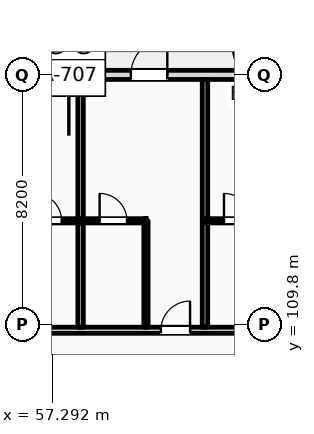
"""IFC4 building model, lengths in metres.
Left out: names, types, materials, properties, quantities, classifications, styles, units other than length and angle.
Written with IfcOpenShell. Run it as: python <this file> out.ifc"""

import sys

from ifc_helpers import new_model, si_unit, direction, frame, frame_2d, origin, place, context, subcontext, project, spatial, rectangle, extrude, element, fill, save


model = new_model("IFC4")
c1 = context("Model", 3, precision=1e-05, world=origin(), true_north=direction((0.0, 1.0)))
c2 = subcontext(c1, "Body", "Model", "MODEL_VIEW")
j1 = project(units=[si_unit("LENGTHUNIT", "METRE"), si_unit("PLANEANGLEUNIT", "RADIAN")], contexts=[c1])
p1 = place(None, origin())
s1 = spatial("IfcSite", under=j1, at=p1, CompositionType="ELEMENT")
p2 = place(p1, origin())
s2 = spatial("IfcBuilding", under=s1, at=p2, CompositionType="ELEMENT")
p3 = place(p2, frame((0.0, 0.0, 28.2)))
s3 = spatial("IfcBuildingStorey", under=s2, at=p3, CompositionType="ELEMENT", Elevation=28.2)
p4 = place(p3, frame((22.5, 118.0, 0.0), z_axis=(0.0, 0.0, 1.0), x_axis=(1.0, 0.0, 0.0)))
e1 = element("IfcWall", 1, at=p4, inside=s3, PredefinedType="STANDARD", context=c2, shape_type="SweptSolid", body=[
    extrude(rectangle(XDim=97.5, YDim=0.3, at=frame_2d((48.75, 0.0))), origin(), (0.0, 0.0, 1.0), 2.8),
])
p5 = place(p4, frame((0.91, 0.0, 0.9)))
e2 = element("IfcOpeningElement", 2, at=p5, cuts=e1, PredefinedType="OPENING", context=c2, shape_type="SweptSolid", body=[
    extrude(rectangle(XDim=0.9, YDim=1.72, at=frame_2d((0.45, 0.86))), frame((0.0, 0.16, 0.0), z_axis=(0.0, -1.0, 0.0), x_axis=(1.0, 0.0, 0.0)), (0.0, 0.0, 1.0), 0.32),
])
p6 = place(p4, frame((6.561, 0.0, 0.0)))
e3 = element("IfcOpeningElement", 3, at=p6, cuts=e1, PredefinedType="OPENING", context=c2, shape_type="SweptSolid", body=[
    extrude(rectangle(XDim=1.2, YDim=2.25, at=frame_2d((0.6, 1.125))), frame((0.0, 0.16, 0.0), z_axis=(0.0, -1.0, 0.0), x_axis=(1.0, 0.0, 0.0)), (0.0, 0.0, 1.0), 0.32),
])
p7 = place(p4, frame((11.477, 0.0, 0.9)))
e4 = element("IfcOpeningElement", 4, at=p7, cuts=e1, PredefinedType="OPENING", context=c2, shape_type="SweptSolid", body=[
    extrude(rectangle(XDim=1.1, YDim=1.5, at=frame_2d((0.55, 0.75))), frame((0.0, 0.16, 0.0), z_axis=(0.0, -1.0, 0.0), x_axis=(1.0, 0.0, 0.0)), (0.0, 0.0, 1.0), 0.32),
])
p8 = place(p4, frame((15.194, 0.0, 0.9)))
e5 = element("IfcOpeningElement", 5, at=p8, cuts=e1, PredefinedType="OPENING", context=c2, shape_type="SweptSolid", body=[
    extrude(rectangle(XDim=1.25, YDim=1.6, at=frame_2d((0.625, 0.8))), frame((0.0, 0.16, 0.0), z_axis=(0.0, -1.0, 0.0), x_axis=(1.0, 0.0, 0.0)), (0.0, 0.0, 1.0), 0.32),
])
p9 = place(p4, frame((19.509, 0.0, 0.9)))
e6 = element("IfcOpeningElement", 6, at=p9, cuts=e1, PredefinedType="OPENING", context=c2, shape_type="SweptSolid", body=[
    extrude(rectangle(XDim=1.4, YDim=1.7, at=frame_2d((0.7, 0.85))), frame((0.0, 0.16, 0.0), z_axis=(0.0, -1.0, 0.0), x_axis=(1.0, 0.0, 0.0)), (0.0, 0.0, 1.0), 0.32),
])
p10 = place(p4, frame((23.258, 0.0, 0.0)))
e7 = element("IfcOpeningElement", 7, at=p10, cuts=e1, PredefinedType="OPENING", context=c2, shape_type="SweptSolid", body=[
    extrude(rectangle(XDim=1.2, YDim=2.25, at=frame_2d((0.6, 1.125))), frame((0.0, 0.16, 0.0), z_axis=(0.0, -1.0, 0.0), x_axis=(1.0, 0.0, 0.0)), (0.0, 0.0, 1.0), 0.32),
])
p11 = place(p4, frame((28.115, 0.0, 0.9)))
e8 = element("IfcOpeningElement", 8, at=p11, cuts=e1, PredefinedType="OPENING", context=c2, shape_type="SweptSolid", body=[
    extrude(rectangle(XDim=1.75, YDim=1.72, at=frame_2d((0.875, 0.86))), frame((0.0, 0.16, 0.0), z_axis=(0.0, -1.0, 0.0), x_axis=(1.0, 0.0, 0.0)), (0.0, 0.0, 1.0), 0.32),
])
p12 = place(p4, frame((31.582, 0.0, 0.9)))
e9 = element("IfcOpeningElement", 9, at=p12, cuts=e1, PredefinedType="OPENING", context=c2, shape_type="SweptSolid", body=[
    extrude(rectangle(XDim=1.35, YDim=1.72, at=frame_2d((0.675, 0.86))), frame((0.0, 0.16, 0.0), z_axis=(0.0, -1.0, 0.0), x_axis=(1.0, 0.0, 0.0)), (0.0, 0.0, 1.0), 0.32),
])
p13 = place(p4, frame((37.379, 0.0, 0.0)))
e10 = element("IfcOpeningElement", 10, at=p13, cuts=e1, PredefinedType="OPENING", context=c2, shape_type="SweptSolid", body=[
    extrude(rectangle(XDim=1.2, YDim=2.25, at=frame_2d((0.6, 1.125))), frame((0.0, 0.16, 0.0), z_axis=(0.0, -1.0, 0.0), x_axis=(1.0, 0.0, 0.0)), (0.0, 0.0, 1.0), 0.32),
])
p14 = place(p4, frame((42.663, 0.0, 0.9)))
e11 = element("IfcOpeningElement", 11, at=p14, cuts=e1, PredefinedType="OPENING", context=c2, shape_type="SweptSolid", body=[
    extrude(rectangle(XDim=1.35, YDim=1.72, at=frame_2d((0.675, 0.86))), frame((0.0, 0.16, 0.0), z_axis=(0.0, -1.0, 0.0), x_axis=(1.0, 0.0, 0.0)), (0.0, 0.0, 1.0), 0.32),
])
p15 = place(p4, frame((45.119, 0.0, 0.9)))
e12 = element("IfcOpeningElement", 12, at=p15, cuts=e1, PredefinedType="OPENING", context=c2, shape_type="SweptSolid", body=[
    extrude(rectangle(XDim=2.871, YDim=1.72, at=frame_2d((1.436, 0.86))), frame((0.0, 0.16, 0.0), z_axis=(0.0, -1.0, 0.0), x_axis=(1.0, 0.0, 0.0)), (0.0, 0.0, 1.0), 0.32),
])
p16 = place(p4, frame((50.41, 0.0, 0.9)))
e13 = element("IfcOpeningElement", 13, at=p16, cuts=e1, PredefinedType="OPENING", context=c2, shape_type="SweptSolid", body=[
    extrude(rectangle(XDim=1.8, YDim=1.72, at=frame_2d((0.9, 0.86))), frame((0.0, 0.16, 0.0), z_axis=(0.0, -1.0, 0.0), x_axis=(1.0, 0.0, 0.0)), (0.0, 0.0, 1.0), 0.32),
])
p17 = place(p4, frame((54.375, 0.0, 0.0)))
e14 = element("IfcOpeningElement", 14, at=p17, cuts=e1, PredefinedType="OPENING", context=c2, shape_type="SweptSolid", body=[
    extrude(rectangle(XDim=1.2, YDim=2.25, at=frame_2d((0.6, 1.125))), frame((0.0, 0.16, 0.0), z_axis=(0.0, -1.0, 0.0), x_axis=(1.0, 0.0, 0.0)), (0.0, 0.0, 1.0), 0.32),
])
p18 = place(p4, frame((59.052, 0.0, 0.9)))
e15 = element("IfcOpeningElement", 15, at=p18, cuts=e1, PredefinedType="OPENING", context=c2, shape_type="SweptSolid", body=[
    extrude(rectangle(XDim=1.35, YDim=1.72, at=frame_2d((0.675, 0.86))), frame((0.0, 0.16, 0.0), z_axis=(0.0, -1.0, 0.0), x_axis=(1.0, 0.0, 0.0)), (0.0, 0.0, 1.0), 0.32),
])
p19 = place(p4, frame((62.768, 0.0, 0.9)))
e16 = element("IfcOpeningElement", 16, at=p19, cuts=e1, PredefinedType="OPENING", context=c2, shape_type="SweptSolid", body=[
    extrude(rectangle(XDim=1.5, YDim=1.72, at=frame_2d((0.75, 0.86))), frame((0.0, 0.16, 0.0), z_axis=(0.0, -1.0, 0.0), x_axis=(1.0, 0.0, 0.0)), (0.0, 0.0, 1.0), 0.32),
])
p20 = place(p4, frame((68.498, 0.0, 0.0)))
e17 = element("IfcOpeningElement", 17, at=p20, cuts=e1, PredefinedType="OPENING", context=c2, shape_type="SweptSolid", body=[
    extrude(rectangle(XDim=1.2, YDim=2.25, at=frame_2d((0.6, 1.125))), frame((0.0, 0.16, 0.0), z_axis=(0.0, -1.0, 0.0), x_axis=(1.0, 0.0, 0.0)), (0.0, 0.0, 1.0), 0.32),
])
p21 = place(p4, frame((71.265, 0.0, 0.9)))
e18 = element("IfcOpeningElement", 18, at=p21, cuts=e1, PredefinedType="OPENING", context=c2, shape_type="SweptSolid", body=[
    extrude(rectangle(XDim=0.9, YDim=1.72, at=frame_2d((0.45, 0.86))), frame((0.0, 0.16, 0.0), z_axis=(0.0, -1.0, 0.0), x_axis=(1.0, 0.0, 0.0)), (0.0, 0.0, 1.0), 0.32),
])
p22 = place(p4, frame((76.316, 0.0, 0.9)))
e19 = element("IfcOpeningElement", 19, at=p22, cuts=e1, PredefinedType="OPENING", context=c2, shape_type="SweptSolid", body=[
    extrude(rectangle(XDim=1.95, YDim=1.72, at=frame_2d((0.975, 0.86))), frame((0.0, 0.16, 0.0), z_axis=(0.0, -1.0, 0.0), x_axis=(1.0, 0.0, 0.0)), (0.0, 0.0, 1.0), 0.32),
])
p23 = place(p4, frame((81.632, 0.0, 0.9)))
e20 = element("IfcOpeningElement", 20, at=p23, cuts=e1, PredefinedType="OPENING", context=c2, shape_type="SweptSolid", body=[
    extrude(rectangle(XDim=1.35, YDim=1.72, at=frame_2d((0.675, 0.86))), frame((0.0, 0.16, 0.0), z_axis=(0.0, -1.0, 0.0), x_axis=(1.0, 0.0, 0.0)), (0.0, 0.0, 1.0), 0.32),
])
p24 = place(p4, frame((84.948, 0.0, 0.9)))
e21 = element("IfcOpeningElement", 21, at=p24, cuts=e1, PredefinedType="OPENING", context=c2, shape_type="SweptSolid", body=[
    extrude(rectangle(XDim=2.25, YDim=1.72, at=frame_2d((1.125, 0.86))), frame((0.0, 0.16, 0.0), z_axis=(0.0, -1.0, 0.0), x_axis=(1.0, 0.0, 0.0)), (0.0, 0.0, 1.0), 0.32),
])
p25 = place(p4, frame((90.063, 0.0, 0.9)))
e22 = element("IfcOpeningElement", 22, at=p25, cuts=e1, PredefinedType="OPENING", context=c2, shape_type="SweptSolid", body=[
    extrude(rectangle(XDim=1.8, YDim=1.72, at=frame_2d((0.9, 0.86))), frame((0.0, 0.16, 0.0), z_axis=(0.0, -1.0, 0.0), x_axis=(1.0, 0.0, 0.0)), (0.0, 0.0, 1.0), 0.32),
])
p26 = place(p4, frame((93.529, 0.0, 0.9)))
e23 = element("IfcOpeningElement", 23, at=p26, cuts=e1, PredefinedType="OPENING", context=c2, shape_type="SweptSolid", body=[
    extrude(rectangle(XDim=2.55, YDim=1.72, at=frame_2d((1.275, 0.86))), frame((0.0, 0.16, 0.0), z_axis=(0.0, -1.0, 0.0), x_axis=(1.0, 0.0, 0.0)), (0.0, 0.0, 1.0), 0.32),
])
p27 = place(p3, frame((10.65, 109.6, 0.0), z_axis=(0.0, 0.0, 1.0), x_axis=(1.0, 0.0, 0.0)))
e24 = element("IfcWall", 24, at=p27, inside=s3, PredefinedType="PARTITIONING", context=c2, shape_type="SweptSolid", body=[
    extrude(rectangle(XDim=109.21, YDim=0.2, at=frame_2d((54.605, 0.0))), origin(), (0.0, 0.0, 1.0), 2.8),
])
p28 = place(p27, frame((12.611, 0.0, 0.0)))
e25 = element("IfcOpeningElement", 25, at=p28, cuts=e24, PredefinedType="OPENING", context=c2, shape_type="SweptSolid", body=[
    extrude(rectangle(XDim=1.02, YDim=2.2, at=frame_2d((0.51, 1.1))), frame((0.0, 0.11, 0.0), z_axis=(0.0, -1.0, 0.0), x_axis=(1.0, 0.0, 0.0)), (0.0, 0.0, 1.0), 0.22),
])
p29 = place(p27, frame((19.451, 0.0, 0.0)))
e26 = element("IfcOpeningElement", 26, at=p29, cuts=e24, PredefinedType="OPENING", context=c2, shape_type="SweptSolid", body=[
    extrude(rectangle(XDim=1.02, YDim=2.2, at=frame_2d((0.51, 1.1))), frame((0.0, 0.11, 0.0), z_axis=(0.0, -1.0, 0.0), x_axis=(1.0, 0.0, 0.0)), (0.0, 0.0, 1.0), 0.22),
])
p30 = place(p27, frame((23.842, 0.0, 0.0)))
e27 = element("IfcOpeningElement", 27, at=p30, cuts=e24, PredefinedType="OPENING", context=c2, shape_type="SweptSolid", body=[
    extrude(rectangle(XDim=1.02, YDim=2.2, at=frame_2d((0.51, 1.1))), frame((0.0, 0.11, 0.0), z_axis=(0.0, -1.0, 0.0), x_axis=(1.0, 0.0, 0.0)), (0.0, 0.0, 1.0), 0.22),
])
p31 = place(p27, frame((26.084, 0.0, 0.0)))
e28 = element("IfcOpeningElement", 28, at=p31, cuts=e24, PredefinedType="OPENING", context=c2, shape_type="SweptSolid", body=[
    extrude(rectangle(XDim=1.02, YDim=2.2, at=frame_2d((0.51, 1.1))), frame((0.0, 0.11, 0.0), z_axis=(0.0, -1.0, 0.0), x_axis=(1.0, 0.0, 0.0)), (0.0, 0.0, 1.0), 0.22),
])
p32 = place(p27, frame((32.655, 0.0, 0.0)))
e29 = element("IfcOpeningElement", 29, at=p32, cuts=e24, PredefinedType="OPENING", context=c2, shape_type="SweptSolid", body=[
    extrude(rectangle(XDim=0.96, YDim=2.2, at=frame_2d((0.48, 1.1))), frame((0.0, 0.11, 0.0), z_axis=(0.0, -1.0, 0.0), x_axis=(1.0, 0.0, 0.0)), (0.0, 0.0, 1.0), 0.22),
])
p33 = place(p27, frame((34.895, 0.0, 0.0)))
e30 = element("IfcOpeningElement", 30, at=p33, cuts=e24, PredefinedType="OPENING", context=c2, shape_type="SweptSolid", body=[
    extrude(rectangle(XDim=0.96, YDim=2.2, at=frame_2d((0.48, 1.1))), frame((0.0, 0.11, 0.0), z_axis=(0.0, -1.0, 0.0), x_axis=(1.0, 0.0, 0.0)), (0.0, 0.0, 1.0), 0.22),
])
p34 = place(p27, frame((41.436, 0.0, 0.0)))
e31 = element("IfcOpeningElement", 31, at=p34, cuts=e24, PredefinedType="OPENING", context=c2, shape_type="SweptSolid", body=[
    extrude(rectangle(XDim=0.96, YDim=2.2, at=frame_2d((0.48, 1.1))), frame((0.0, 0.11, 0.0), z_axis=(0.0, -1.0, 0.0), x_axis=(1.0, 0.0, 0.0)), (0.0, 0.0, 1.0), 0.22),
])
p35 = place(p27, frame((43.427, 0.0, 0.0)))
e32 = element("IfcOpeningElement", 32, at=p35, cuts=e24, PredefinedType="OPENING", context=c2, shape_type="SweptSolid", body=[
    extrude(rectangle(XDim=0.96, YDim=2.2, at=frame_2d((0.48, 1.1))), frame((0.0, 0.11, 0.0), z_axis=(0.0, -1.0, 0.0), x_axis=(1.0, 0.0, 0.0)), (0.0, 0.0, 1.0), 0.22),
])
p36 = place(p27, frame((50.218, 0.0, 0.0)))
e33 = element("IfcOpeningElement", 33, at=p36, cuts=e24, PredefinedType="OPENING", context=c2, shape_type="SweptSolid", body=[
    extrude(rectangle(XDim=0.96, YDim=2.2, at=frame_2d((0.48, 1.1))), frame((0.0, 0.11, 0.0), z_axis=(0.0, -1.0, 0.0), x_axis=(1.0, 0.0, 0.0)), (0.0, 0.0, 1.0), 0.22),
])
p37 = place(p27, frame((54.859, 0.0, 0.0)))
e34 = element("IfcOpeningElement", 34, at=p37, cuts=e24, PredefinedType="OPENING", context=c2, shape_type="SweptSolid", body=[
    extrude(rectangle(XDim=0.96, YDim=2.2, at=frame_2d((0.48, 1.1))), frame((0.0, 0.11, 0.0), z_axis=(0.0, -1.0, 0.0), x_axis=(1.0, 0.0, 0.0)), (0.0, 0.0, 1.0), 0.22),
])
p38 = place(p27, frame((59.0, 0.0, 0.0)))
e35 = element("IfcOpeningElement", 35, at=p38, cuts=e24, PredefinedType="OPENING", context=c2, shape_type="SweptSolid", body=[
    extrude(rectangle(XDim=0.96, YDim=2.2, at=frame_2d((0.48, 1.1))), frame((0.0, 0.11, 0.0), z_axis=(0.0, -1.0, 0.0), x_axis=(1.0, 0.0, 0.0)), (0.0, 0.0, 1.0), 0.22),
])
p39 = place(p27, frame((63.39, 0.0, 0.0)))
e36 = element("IfcOpeningElement", 36, at=p39, cuts=e24, PredefinedType="OPENING", context=c2, shape_type="SweptSolid", body=[
    extrude(rectangle(XDim=0.96, YDim=2.2, at=frame_2d((0.48, 1.1))), frame((0.0, 0.11, 0.0), z_axis=(0.0, -1.0, 0.0), x_axis=(1.0, 0.0, 0.0)), (0.0, 0.0, 1.0), 0.22),
])
p40 = place(p27, frame((65.631, 0.0, 0.0)))
e37 = element("IfcOpeningElement", 37, at=p40, cuts=e24, PredefinedType="OPENING", context=c2, shape_type="SweptSolid", body=[
    extrude(rectangle(XDim=0.96, YDim=2.2, at=frame_2d((0.48, 1.1))), frame((0.0, 0.11, 0.0), z_axis=(0.0, -1.0, 0.0), x_axis=(1.0, 0.0, 0.0)), (0.0, 0.0, 1.0), 0.22),
])
p41 = place(p27, frame((72.172, 0.0, 0.0)))
e38 = element("IfcOpeningElement", 38, at=p41, cuts=e24, PredefinedType="OPENING", context=c2, shape_type="SweptSolid", body=[
    extrude(rectangle(XDim=0.96, YDim=2.2, at=frame_2d((0.48, 1.1))), frame((0.0, 0.11, 0.0), z_axis=(0.0, -1.0, 0.0), x_axis=(1.0, 0.0, 0.0)), (0.0, 0.0, 1.0), 0.22),
])
p42 = place(p27, frame((74.413, 0.0, 0.0)))
e39 = element("IfcOpeningElement", 39, at=p42, cuts=e24, PredefinedType="OPENING", context=c2, shape_type="SweptSolid", body=[
    extrude(rectangle(XDim=0.96, YDim=2.2, at=frame_2d((0.48, 1.1))), frame((0.0, 0.11, 0.0), z_axis=(0.0, -1.0, 0.0), x_axis=(1.0, 0.0, 0.0)), (0.0, 0.0, 1.0), 0.22),
])
p43 = place(p27, frame((80.954, 0.0, 0.0)))
e40 = element("IfcOpeningElement", 40, at=p43, cuts=e24, PredefinedType="OPENING", context=c2, shape_type="SweptSolid", body=[
    extrude(rectangle(XDim=0.96, YDim=2.2, at=frame_2d((0.48, 1.1))), frame((0.0, 0.11, 0.0), z_axis=(0.0, -1.0, 0.0), x_axis=(1.0, 0.0, 0.0)), (0.0, 0.0, 1.0), 0.22),
])
p44 = place(p27, frame((83.195, 0.0, 0.0)))
e41 = element("IfcOpeningElement", 41, at=p44, cuts=e24, PredefinedType="OPENING", context=c2, shape_type="SweptSolid", body=[
    extrude(rectangle(XDim=0.96, YDim=2.2, at=frame_2d((0.48, 1.1))), frame((0.0, 0.11, 0.0), z_axis=(0.0, -1.0, 0.0), x_axis=(1.0, 0.0, 0.0)), (0.0, 0.0, 1.0), 0.22),
])
p45 = place(p27, frame((89.735, 0.0, 0.0)))
e42 = element("IfcOpeningElement", 42, at=p45, cuts=e24, PredefinedType="OPENING", context=c2, shape_type="SweptSolid", body=[
    extrude(rectangle(XDim=0.96, YDim=2.2, at=frame_2d((0.48, 1.1))), frame((0.0, 0.11, 0.0), z_axis=(0.0, -1.0, 0.0), x_axis=(1.0, 0.0, 0.0)), (0.0, 0.0, 1.0), 0.22),
])
p46 = place(p27, frame((94.126, 0.0, 0.0)))
e43 = element("IfcOpeningElement", 43, at=p46, cuts=e24, PredefinedType="OPENING", context=c2, shape_type="SweptSolid", body=[
    extrude(rectangle(XDim=0.96, YDim=2.2, at=frame_2d((0.48, 1.1))), frame((0.0, 0.11, 0.0), z_axis=(0.0, -1.0, 0.0), x_axis=(1.0, 0.0, 0.0)), (0.0, 0.0, 1.0), 0.22),
])
p47 = place(p27, frame((98.517, 0.0, 0.0)))
e44 = element("IfcOpeningElement", 44, at=p47, cuts=e24, PredefinedType="OPENING", context=c2, shape_type="SweptSolid", body=[
    extrude(rectangle(XDim=0.96, YDim=2.2, at=frame_2d((0.48, 1.1))), frame((0.0, 0.11, 0.0), z_axis=(0.0, -1.0, 0.0), x_axis=(1.0, 0.0, 0.0)), (0.0, 0.0, 1.0), 0.22),
])
p48 = place(p27, frame((102.908, 0.0, 0.0)))
e45 = element("IfcOpeningElement", 45, at=p48, cuts=e24, PredefinedType="OPENING", context=c2, shape_type="SweptSolid", body=[
    extrude(rectangle(XDim=0.96, YDim=2.2, at=frame_2d((0.48, 1.1))), frame((0.0, 0.11, 0.0), z_axis=(0.0, -1.0, 0.0), x_axis=(1.0, 0.0, 0.0)), (0.0, 0.0, 1.0), 0.22),
])
p49 = place(p27, frame((105.099, 0.0, 0.0)))
e46 = element("IfcOpeningElement", 46, at=p49, cuts=e24, PredefinedType="OPENING", context=c2, shape_type="SweptSolid", body=[
    extrude(rectangle(XDim=0.96, YDim=2.2, at=frame_2d((0.48, 1.1))), frame((0.0, 0.11, 0.0), z_axis=(0.0, -1.0, 0.0), x_axis=(1.0, 0.0, 0.0)), (0.0, 0.0, 1.0), 0.22),
])
p50 = place(p27, frame((2.716, 0.0, 0.0)))
e47 = element("IfcOpeningElement", 47, at=p50, cuts=e24, PredefinedType="OPENING", context=c2, shape_type="SweptSolid", body=[
    extrude(rectangle(XDim=1.35, YDim=2.25, at=frame_2d((0.675, 1.125))), frame((0.0, 0.11, 0.0), z_axis=(0.0, -1.0, 0.0), x_axis=(1.0, 0.0, 0.0)), (0.0, 0.0, 1.0), 0.22),
])
p51 = place(p27, frame((6.65, 0.0, 0.0)))
e48 = element("IfcOpeningElement", 48, at=p51, cuts=e24, PredefinedType="OPENING", context=c2, shape_type="SweptSolid", body=[
    extrude(rectangle(XDim=1.35, YDim=2.25, at=frame_2d((0.675, 1.125))), frame((0.0, 0.11, 0.0), z_axis=(0.0, -1.0, 0.0), x_axis=(1.0, 0.0, 0.0)), (0.0, 0.0, 1.0), 0.22),
])
p52 = place(p27, frame((10.583, 0.0, 0.0)))
e49 = element("IfcOpeningElement", 49, at=p52, cuts=e24, PredefinedType="OPENING", context=c2, shape_type="SweptSolid", body=[
    extrude(rectangle(XDim=1.35, YDim=2.25, at=frame_2d((0.675, 1.125))), frame((0.0, 0.11, 0.0), z_axis=(0.0, -1.0, 0.0), x_axis=(1.0, 0.0, 0.0)), (0.0, 0.0, 1.0), 0.22),
])
p53 = place(p3, frame((58.227, 109.7, 0.0), z_axis=(0.0, 0.0, 1.0), x_axis=(0.0, 1.0, 0.0)))
e50 = element("IfcWall", 50, at=p53, inside=s3, PredefinedType="PARTITIONING", context=c2, shape_type="SweptSolid", body=[
    extrude(rectangle(XDim=8.15, YDim=0.18, at=frame_2d((4.075, 0.0))), origin(), (0.0, 0.0, 1.0), 3.36),
])
p54 = place(p3, frame((56.077, 113.2, 0.0), z_axis=(0.0, 0.0, 1.0), x_axis=(1.0, 0.0, 0.0)))
e51 = element("IfcWall", 51, at=p54, inside=s3, PredefinedType="PARTITIONING", context=c2, shape_type="SweptSolid", body=[
    extrude(rectangle(XDim=2.15, YDim=0.14, at=frame_2d((1.075, 0.0))), origin(), (0.0, 0.0, 1.0), 3.36),
])
p55 = place(p54, frame((0.625, 0.0, 0.0)))
e52 = element("IfcOpeningElement", 52, at=p55, cuts=e51, PredefinedType="OPENING", context=c2, shape_type="SweptSolid", body=[
    extrude(rectangle(XDim=0.9, YDim=2.1, at=frame_2d((0.45, 1.05))), frame((0.0, 0.08, 0.0), z_axis=(0.0, -1.0, 0.0), x_axis=(1.0, 0.0, 0.0)), (0.0, 0.0, 1.0), 0.16),
])
p56 = place(p3, frame((62.318, 109.7, 0.0), z_axis=(0.0, 0.0, 1.0), x_axis=(0.0, 1.0, 0.0)))
e53 = element("IfcWall", 53, at=p56, inside=s3, PredefinedType="PARTITIONING", context=c2, shape_type="SweptSolid", body=[
    extrude(rectangle(XDim=8.15, YDim=0.18, at=frame_2d((4.075, 0.0))), origin(), (0.0, 0.0, 1.0), 3.36),
])
p57 = place(p3, frame((60.377, 109.7, 0.0), z_axis=(0.0, 0.0, 1.0), x_axis=(0.0, 1.0, 0.0)))
e54 = element("IfcWall", 54, at=p57, inside=s3, PredefinedType="PARTITIONING", context=c2, shape_type="SweptSolid", body=[
    extrude(rectangle(XDim=3.5, YDim=0.14, at=frame_2d((1.75, 0.0))), origin(), (0.0, 0.0, 1.0), 3.36),
])
p58 = place(p3, frame((58.227, 113.2, 0.0), z_axis=(0.0, 0.0, 1.0), x_axis=(1.0, 0.0, 0.0)))
e55 = element("IfcWall", 55, at=p58, inside=s3, PredefinedType="PARTITIONING", context=c2, shape_type="SweptSolid", body=[
    extrude(rectangle(XDim=2.15, YDim=0.14, at=frame_2d((1.075, 0.0))), origin(), (0.0, 0.0, 1.0), 3.36),
])
p59 = place(p58, frame((0.625, 0.0, 0.0)))
e56 = element("IfcOpeningElement", 56, at=p59, cuts=e55, PredefinedType="OPENING", context=c2, shape_type="SweptSolid", body=[
    extrude(rectangle(XDim=0.9, YDim=2.1, at=frame_2d((0.45, 1.05))), frame((0.0, 0.08, 0.0), z_axis=(0.0, -1.0, 0.0), x_axis=(1.0, 0.0, 0.0)), (0.0, 0.0, 1.0), 0.16),
])
p60 = place(p3, frame((62.318, 113.2, 0.0), z_axis=(0.0, 0.0, 1.0), x_axis=(1.0, 0.0, 0.0)))
e57 = element("IfcWall", 57, at=p60, inside=s3, PredefinedType="PARTITIONING", context=c2, shape_type="SweptSolid", body=[
    extrude(rectangle(XDim=2.15, YDim=0.14, at=frame_2d((1.075, 0.0))), origin(), (0.0, 0.0, 1.0), 3.36),
])
p61 = place(p60, frame((0.625, 0.0, 0.0)))
e58 = element("IfcOpeningElement", 58, at=p61, cuts=e57, PredefinedType="OPENING", context=c2, shape_type="SweptSolid", body=[
    extrude(rectangle(XDim=0.9, YDim=2.1, at=frame_2d((0.45, 1.05))), frame((0.0, 0.08, 0.0), z_axis=(0.0, -1.0, 0.0), x_axis=(1.0, 0.0, 0.0)), (0.0, 0.0, 1.0), 0.16),
])
p62 = place(p13, origin())
e59 = element("IfcDoor", 59, at=p62, inside=s3, OperationType="SINGLE_SWING_RIGHT", PredefinedType="DOOR", context=c2, shape_type="SweptSolid", body=[
    extrude(rectangle(XDim=1.2, YDim=2.25, at=frame_2d((0.6, 1.125))), frame((0.0, 0.025, 0.0), z_axis=(0.0, -1.0, 0.0), x_axis=(1.0, 0.0, 0.0)), (0.0, 0.0, 1.0), 0.05),
])
fill(e10, e59)
p63 = place(p55, origin())
e60 = element("IfcDoor", 60, at=p63, inside=s3, OperationType="SINGLE_SWING_LEFT", PredefinedType="DOOR", context=c2, shape_type="SweptSolid", body=[
    extrude(rectangle(XDim=0.9, YDim=2.1, at=frame_2d((0.45, 1.05))), frame((0.0, 0.025, 0.0), z_axis=(0.0, -1.0, 0.0), x_axis=(1.0, 0.0, 0.0)), (0.0, 0.0, 1.0), 0.05),
])
fill(e52, e60)
p64 = place(p36, origin())
e61 = element("IfcDoor", 61, at=p64, inside=s3, OperationType="SINGLE_SWING_RIGHT", PredefinedType="DOOR", context=c2, shape_type="SweptSolid", body=[
    extrude(rectangle(XDim=0.96, YDim=2.2, at=frame_2d((0.48, 1.1))), frame((0.0, 0.025, 0.0), z_axis=(0.0, -1.0, 0.0), x_axis=(1.0, 0.0, 0.0)), (0.0, 0.0, 1.0), 0.05),
])
fill(e33, e61)
p65 = place(p59, origin())
e62 = element("IfcDoor", 62, at=p65, inside=s3, OperationType="SINGLE_SWING_LEFT", PredefinedType="DOOR", context=c2, shape_type="SweptSolid", body=[
    extrude(rectangle(XDim=0.9, YDim=2.1, at=frame_2d((0.45, 1.05))), frame((0.0, 0.025, 0.0), z_axis=(0.0, -1.0, 0.0), x_axis=(1.0, 0.0, 0.0)), (0.0, 0.0, 1.0), 0.05),
])
fill(e56, e62)
p66 = place(p61, origin())
e63 = element("IfcDoor", 63, at=p66, inside=s3, OperationType="SINGLE_SWING_LEFT", PredefinedType="DOOR", context=c2, shape_type="SweptSolid", body=[
    extrude(rectangle(XDim=0.9, YDim=2.1, at=frame_2d((0.45, 1.05))), frame((0.0, 0.025, 0.0), z_axis=(0.0, -1.0, 0.0), x_axis=(1.0, 0.0, 0.0)), (0.0, 0.0, 1.0), 0.05),
])
fill(e58, e63)
save(model, sys.argv[1])
